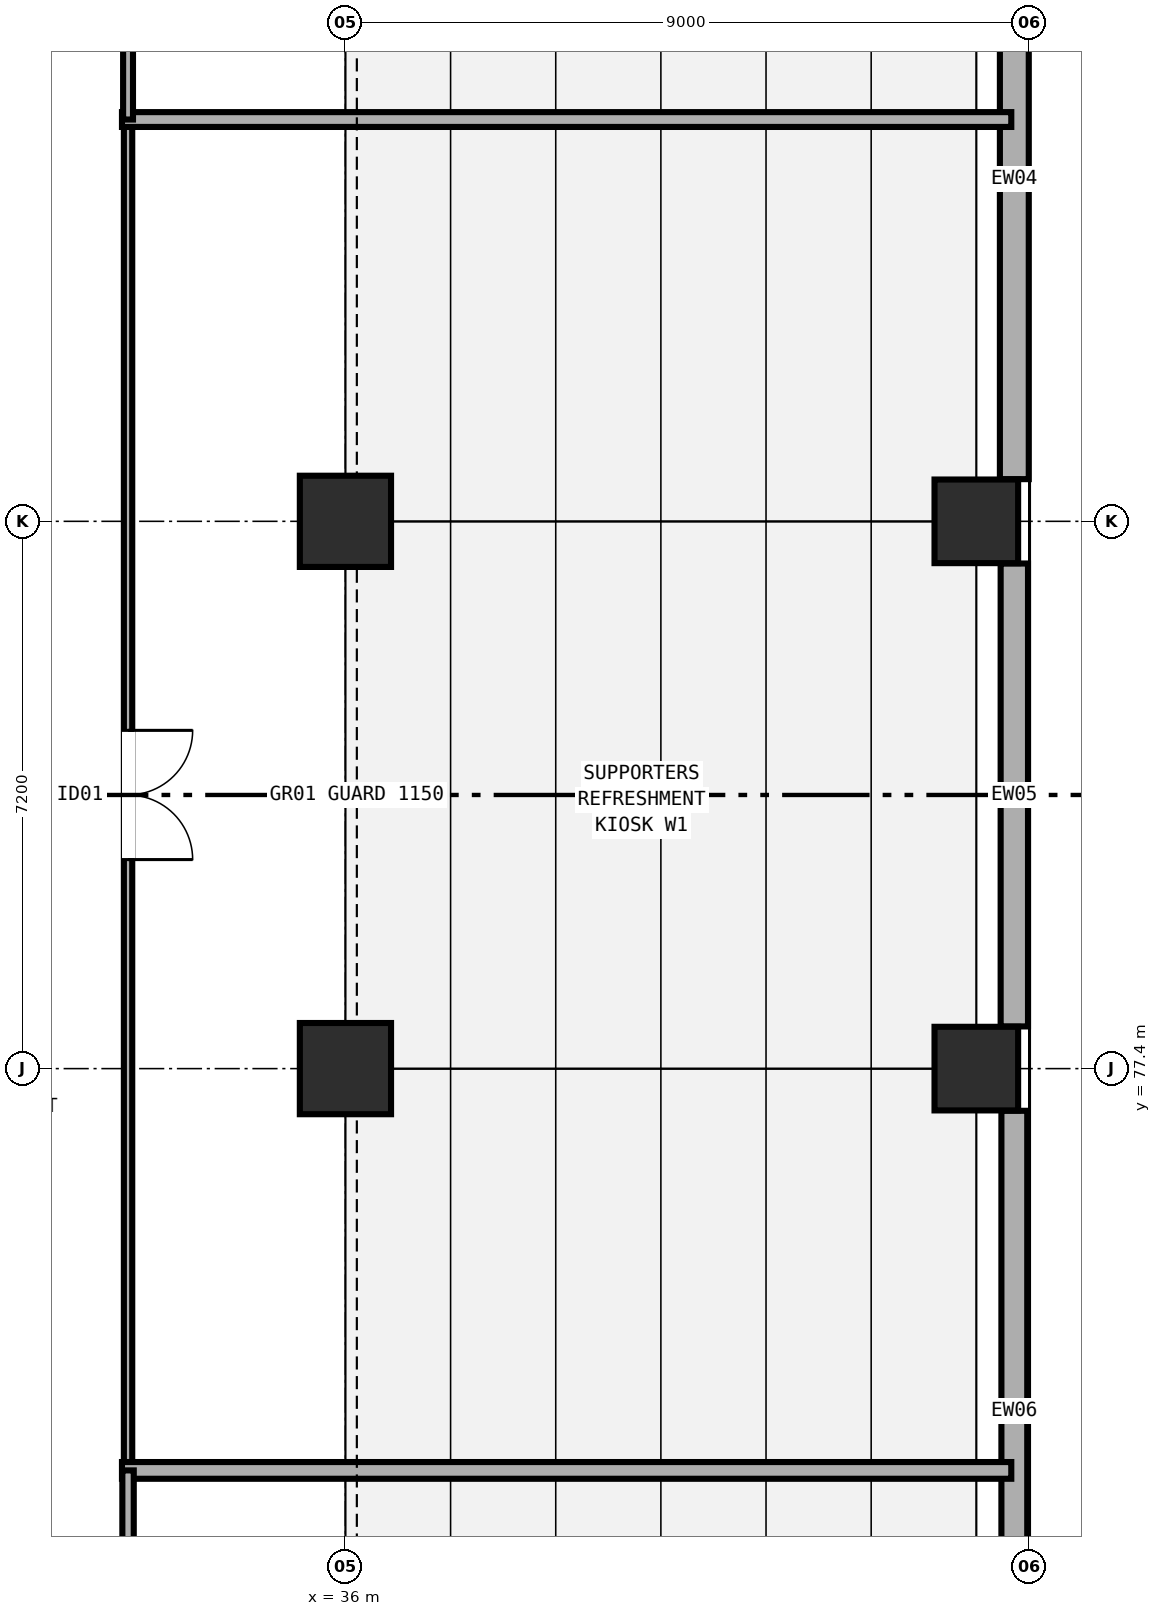
"""IFC4 building model, lengths in metres.
Left out: names, types, materials, properties, quantities, classifications, styles, units other than length and angle.
Written with IfcOpenShell. Run it as: python <this file> out.ifc"""

import sys

from ifc_helpers import new_model, si_unit, direction, frame, frame_2d, origin, origin_2d, place, context, subcontext, project, spatial, rectangle, extrude, element, fill, save


model = new_model("IFC4")
c1 = context("Model", 3, precision=1e-05, world=origin(), true_north=direction((0.0, 1.0)))
c2 = subcontext(c1, "Body", "Model", "MODEL_VIEW")
j1 = project(units=[si_unit("LENGTHUNIT", "METRE"), si_unit("PLANEANGLEUNIT", "RADIAN")], contexts=[c1])
p1 = place(None, origin())
s1 = spatial("IfcSite", under=j1, at=p1, CompositionType="ELEMENT")
p2 = place(p1, origin())
s2 = spatial("IfcBuilding", under=s1, at=p2, CompositionType="ELEMENT")
p3 = place(p2, frame((0.0, 0.0, 4.8)))
s3 = spatial("IfcBuildingStorey", under=s2, at=p3, CompositionType="ELEMENT", Elevation=4.8)
for number, where, z_axis, x_axis in (
    (1, (36.0, 77.4, 0.0), (0.0, 0.0, 1.0), (1.0, 0.0, 0.0)),
    (2, (36.0, 84.6, 0.0), (0.0, 0.0, 1.0), (1.0, 0.0, 0.0)),
):
    element("IfcColumn", number, at=place(p3, frame(where, z_axis=z_axis, x_axis=x_axis)), inside=s3, PredefinedType="COLUMN", context=c2, shape_type="SweptSolid", body=[
        extrude(rectangle(XDim=1.2, YDim=1.2, at=origin_2d()), origin(), (0.0, 0.0, 1.0), 4.8),
    ])
for number, where, z_axis, x_axis in (
    (3, (44.3, 77.4, 0.0), (0.0, 0.0, 1.0), (1.0, 0.0, 0.0)),
    (4, (44.3, 84.6, 0.0), (0.0, 0.0, 1.0), (1.0, 0.0, 0.0)),
):
    element("IfcColumn", number, at=place(p3, frame(where, z_axis=z_axis, x_axis=x_axis)), inside=s3, PredefinedType="COLUMN", context=c2, shape_type="SweptSolid", body=[
        extrude(rectangle(XDim=1.1, YDim=1.1, at=origin_2d()), origin(), (0.0, 0.0, 1.0), 4.8),
    ])
p4 = place(p3, frame((44.8, 93.045, 0.0), z_axis=(0.0, 0.0, 1.0), x_axis=(0.0, -1.0, 0.0)))
e5 = element("IfcWall", 5, at=p4, inside=s3, PredefinedType="SOLIDWALL", context=c2, shape_type="SweptSolid", body=[
    extrude(rectangle(XDim=7.89, YDim=0.38, at=frame_2d((3.945, 0.0))), origin(), (0.0, 0.0, 1.0), 3.28),
])
p5 = place(p3, frame((44.8, 84.045, 0.0), z_axis=(0.0, 0.0, 1.0), x_axis=(0.0, -1.0, 0.0)))
e6 = element("IfcWall", 6, at=p5, inside=s3, PredefinedType="SOLIDWALL", context=c2, shape_type="SweptSolid", body=[
    extrude(rectangle(XDim=6.09, YDim=0.36, at=frame_2d((3.045, 0.0))), origin(), (0.0, 0.0, 1.0), 3.28),
])
p6 = place(p3, frame((44.8, 76.845, 0.0), z_axis=(0.0, 0.0, 1.0), x_axis=(0.0, -1.0, 0.0)))
e7 = element("IfcWall", 7, at=p6, inside=s3, PredefinedType="SOLIDWALL", context=c2, shape_type="SweptSolid", body=[
    extrude(rectangle(XDim=7.89, YDim=0.34, at=frame_2d((3.945, 0.0))), origin(), (0.0, 0.0, 1.0), 3.28),
])
p7 = place(p3, frame((33.14, 89.886, 0.0), z_axis=(0.0, 0.0, 1.0), x_axis=(0.0, -1.0, 0.0)))
e8 = element("IfcWall", 8, at=p7, inside=s3, PredefinedType="PARTITIONING", context=c2, shape_type="SweptSolid", body=[
    extrude(rectangle(XDim=17.772, YDim=0.11, at=frame_2d((8.886, 0.0))), origin(), (0.0, 0.0, 1.0), 3.28),
])
p8 = place(p7, frame((8.036, 0.0, 0.0)))
e9 = element("IfcOpeningElement", 9, at=p8, cuts=e8, PredefinedType="OPENING", context=c2, shape_type="SweptSolid", body=[
    extrude(rectangle(XDim=1.7, YDim=2.2, at=frame_2d((0.85, 1.1))), frame((0.0, 0.065, 0.0), z_axis=(0.0, -1.0, 0.0), x_axis=(1.0, 0.0, 0.0)), (0.0, 0.0, 1.0), 0.13),
])
p9 = place(p3, frame((44.76, 72.114, 0.0), z_axis=(0.0, 0.0, 1.0), x_axis=(-1.0, 0.0, 0.0)))
e10 = element("IfcWall", 10, at=p9, inside=s3, PredefinedType="PARTITIONING", context=c2, shape_type="SweptSolid", body=[
    extrude(rectangle(XDim=11.7, YDim=0.22, at=frame_2d((5.85, 0.0))), origin(), (0.0, 0.0, 1.0), 3.28),
])
p10 = place(p3, frame((33.06, 89.886, 0.0), z_axis=(0.0, 0.0, 1.0), x_axis=(1.0, 0.0, 0.0)))
e11 = element("IfcWall", 11, at=p10, inside=s3, PredefinedType="PARTITIONING", context=c2, shape_type="SweptSolid", body=[
    extrude(rectangle(XDim=11.7, YDim=0.195, at=frame_2d((5.85, 0.0))), origin(), (0.0, 0.0, 1.0), 3.28),
])
p11 = place(p3, frame((33.14, 107.658, 0.0), z_axis=(0.0, 0.0, 1.0), x_axis=(0.0, -1.0, 0.0)))
e12 = element("IfcWall", 12, at=p11, inside=s3, PredefinedType="PARTITIONING", context=c2, shape_type="SweptSolid", body=[
    extrude(rectangle(XDim=17.772, YDim=0.13, at=frame_2d((8.886, 0.0))), origin(), (0.0, 0.0, 1.0), 3.28),
])
p12 = place(p11, frame((8.036, 0.0, 0.0)))
e13 = element("IfcOpeningElement", 13, at=p12, cuts=e12, PredefinedType="OPENING", context=c2, shape_type="SweptSolid", body=[
    extrude(rectangle(XDim=1.7, YDim=2.2, at=frame_2d((0.85, 1.1))), frame((0.0, 0.075, 0.0), z_axis=(0.0, -1.0, 0.0), x_axis=(1.0, 0.0, 0.0)), (0.0, 0.0, 1.0), 0.15),
])
p13 = place(p3, frame((33.14, 72.114, 0.0), z_axis=(0.0, 0.0, 1.0), x_axis=(0.0, -1.0, 0.0)))
e14 = element("IfcWall", 14, at=p13, inside=s3, PredefinedType="PARTITIONING", context=c2, shape_type="SweptSolid", body=[
    extrude(rectangle(XDim=17.772, YDim=0.15, at=frame_2d((8.886, 0.0))), origin(), (0.0, 0.0, 1.0), 3.28),
])
p14 = place(p13, frame((8.111, 0.0, 0.0)))
e15 = element("IfcOpeningElement", 15, at=p14, cuts=e14, PredefinedType="OPENING", context=c2, shape_type="SweptSolid", body=[
    extrude(rectangle(XDim=1.55, YDim=2.2, at=frame_2d((0.775, 1.1))), frame((0.0, 0.085, 0.0), z_axis=(0.0, -1.0, 0.0), x_axis=(1.0, 0.0, 0.0)), (0.0, 0.0, 1.0), 0.17),
])
p15 = place(p8, origin())
e16 = element("IfcDoor", 16, at=p15, inside=s3, OperationType="DOUBLE_DOOR_SINGLE_SWING", PredefinedType="DOOR", context=c2, shape_type="SweptSolid", body=[
    extrude(rectangle(XDim=1.7, YDim=2.2, at=frame_2d((0.85, 1.1))), frame((0.0, 0.025, 0.0), z_axis=(0.0, -1.0, 0.0), x_axis=(1.0, 0.0, 0.0)), (0.0, 0.0, 1.0), 0.05),
])
fill(e9, e16)
save(model, sys.argv[1])
